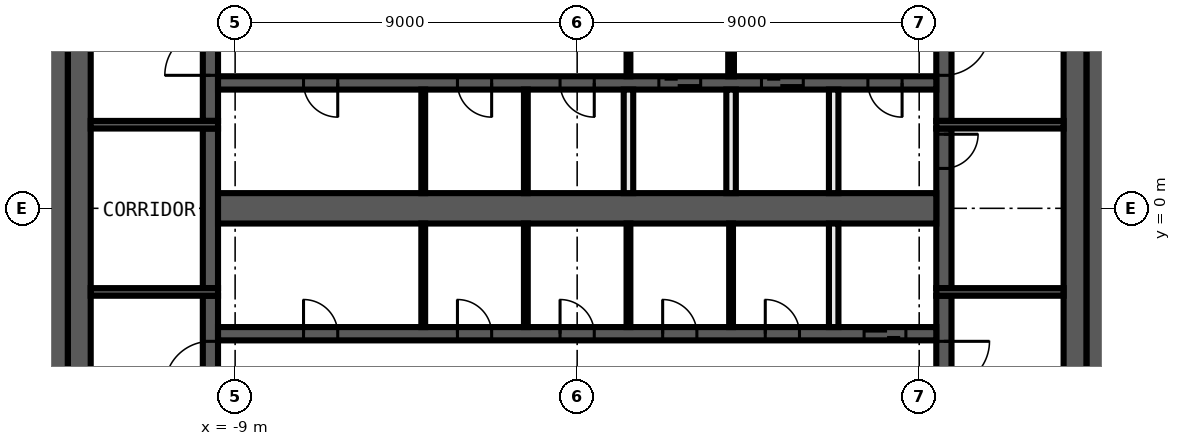
"""IFC4 building model, lengths in metres.
Left out: names, types, materials, properties, quantities, classifications, styles, units other than length and angle.
Written with IfcOpenShell. Run it as: python <this file> out.ifc"""

import sys

from ifc_helpers import new_model, si_unit, direction, frame, frame_2d, origin, place, context, subcontext, project, spatial, rectangle, extrude, element, fill, save


model = new_model("IFC4")
c1 = context("Model", 3, precision=1e-05, world=origin(), true_north=direction((0.0, 1.0)))
c2 = subcontext(c1, "Body", "Model", "MODEL_VIEW")
j1 = project(units=[si_unit("LENGTHUNIT", "METRE"), si_unit("PLANEANGLEUNIT", "RADIAN")], contexts=[c1])
p1 = place(None, origin())
s1 = spatial("IfcSite", under=j1, at=p1, CompositionType="ELEMENT")
p2 = place(p1, origin())
s2 = spatial("IfcBuilding", under=s1, at=p2, CompositionType="ELEMENT")
p3 = place(p2, frame((0.0, 0.0, 371.6)))
s3 = spatial("IfcBuildingStorey", under=s2, at=p3, CompositionType="ELEMENT", Elevation=371.6)
p4 = place(p3, frame((11.367, -20.469, 0.0), z_axis=(0.0, 0.0, 1.0), x_axis=(0.424125024155, 0.905603646131, 0.0)))
e1 = element("IfcWall", 1, at=p4, inside=s3, PredefinedType="SOLIDWALL", context=c2, shape_type="SweptSolid", body=[
    extrude(rectangle(XDim=28.801, YDim=0.25, at=frame_2d((14.401, 0.0))), origin(), (0.0, 0.0, 1.0), 3.8),
])
p5 = place(p3, frame((-11.138, 20.28, 0.0), z_axis=(0.0, 0.0, 1.0), x_axis=(-0.441342255748, -0.897338850876, 0.0)))
e2 = element("IfcWall", 2, at=p5, inside=s3, PredefinedType="SOLIDWALL", context=c2, shape_type="SweptSolid", body=[
    extrude(rectangle(XDim=28.805, YDim=0.25, at=frame_2d((14.403, 0.0))), origin(), (0.0, 0.0, 1.0), 3.8),
])
for number, where, z_axis, x_axis in (
    (3, (13.7, 10.4, 0.0), (0.0, 0.0, 1.0), (0.0, -1.0, 0.0)),
    (4, (-13.7, -10.4, 0.0), (0.0, 0.0, 1.0), (0.0, 1.0, 0.0)),
):
    element("IfcWall", number, at=place(p3, frame(where, z_axis=z_axis, x_axis=x_axis)), inside=s3, PredefinedType="SHEAR", context=c2, shape_type="SweptSolid", body=[
        extrude(rectangle(XDim=20.8, YDim=0.6, at=frame_2d((10.4, 0.0))), origin(), (0.0, 0.0, 1.0), 3.9),
    ])
for number, where, z_axis, x_axis in (
    (5, (13.1, 9.8, 0.0), (0.0, 0.0, 1.0), (0.0, -1.0, 0.0)),
    (6, (-13.1, -9.8, 0.0), (0.0, 0.0, 1.0), (0.0, 1.0, 0.0)),
):
    element("IfcWall", number, at=place(p3, frame(where, z_axis=z_axis, x_axis=x_axis)), inside=s3, PredefinedType="SHEAR", context=c2, shape_type="SweptSolid", body=[
        extrude(rectangle(XDim=19.6, YDim=0.6, at=frame_2d((9.8, 0.0))), origin(), (0.0, 0.0, 1.0), 3.9),
    ])
p6 = place(p3, frame((9.65, -2.3, 0.0), z_axis=(0.0, 0.0, 1.0), x_axis=(0.0, -1.0, 0.0)))
e7 = element("IfcWall", 7, at=p6, inside=s3, PredefinedType="SHEAR", context=c2, shape_type="SweptSolid", body=[
    extrude(rectangle(XDim=7.5, YDim=0.4, at=frame_2d((3.75, 0.0))), origin(), (0.0, 0.0, 1.0), 3.9),
])
p7 = place(p6, frame((1.2, 0.0, 0.0)))
e8 = element("IfcOpeningElement", 8, at=p7, cuts=e7, PredefinedType="OPENING", context=c2, shape_type="SweptSolid", body=[
    extrude(rectangle(XDim=1.2, YDim=2.1, at=frame_2d((0.6, 1.05))), frame((0.0, 0.21, 0.0), z_axis=(0.0, -1.0, 0.0), x_axis=(1.0, 0.0, 0.0)), (0.0, 0.0, 1.0), 0.42),
])
p8 = place(p3, frame((9.65, 2.1, 0.0), z_axis=(0.0, 0.0, 1.0), x_axis=(0.0, -1.0, 0.0)))
e9 = element("IfcWall", 9, at=p8, inside=s3, PredefinedType="SHEAR", context=c2, shape_type="SweptSolid", body=[
    extrude(rectangle(XDim=4.2, YDim=0.4, at=frame_2d((2.1, 0.0))), origin(), (0.0, 0.0, 1.0), 3.9),
])
p9 = place(p8, frame((0.15, 0.0, 0.0)))
e10 = element("IfcOpeningElement", 10, at=p9, cuts=e9, PredefinedType="OPENING", context=c2, shape_type="SweptSolid", body=[
    extrude(rectangle(XDim=0.9, YDim=2.1, at=frame_2d((0.45, 1.05))), frame((0.0, 0.21, 0.0), z_axis=(0.0, -1.0, 0.0), x_axis=(1.0, 0.0, 0.0)), (0.0, 0.0, 1.0), 0.42),
])
p10 = place(p3, frame((9.65, 9.8, 0.0), z_axis=(0.0, 0.0, 1.0), x_axis=(0.0, -1.0, 0.0)))
e11 = element("IfcWall", 11, at=p10, inside=s3, PredefinedType="SHEAR", context=c2, shape_type="SweptSolid", body=[
    extrude(rectangle(XDim=7.5, YDim=0.4, at=frame_2d((3.75, 0.0))), origin(), (0.0, 0.0, 1.0), 3.9),
])
p11 = place(p10, frame((5.1, 0.0, 0.0)))
e12 = element("IfcOpeningElement", 12, at=p11, cuts=e11, PredefinedType="OPENING", context=c2, shape_type="SweptSolid", body=[
    extrude(rectangle(XDim=1.2, YDim=2.1, at=frame_2d((0.6, 1.05))), frame((0.0, 0.21, 0.0), z_axis=(0.0, -1.0, 0.0), x_axis=(1.0, 0.0, 0.0)), (0.0, 0.0, 1.0), 0.42),
])
p12 = place(p3, frame((-9.65, -9.8, 0.0), z_axis=(0.0, 0.0, 1.0), x_axis=(0.0, 1.0, 0.0)))
e13 = element("IfcWall", 13, at=p12, inside=s3, PredefinedType="SHEAR", context=c2, shape_type="SweptSolid", body=[
    extrude(rectangle(XDim=7.5, YDim=0.4, at=frame_2d((3.75, 0.0))), origin(), (0.0, 0.0, 1.0), 3.9),
])
p13 = place(p12, frame((5.1, 0.0, 0.0)))
e14 = element("IfcOpeningElement", 14, at=p13, cuts=e13, PredefinedType="OPENING", context=c2, shape_type="SweptSolid", body=[
    extrude(rectangle(XDim=1.2, YDim=2.1, at=frame_2d((0.6, 1.05))), frame((0.0, 0.21, 0.0), z_axis=(0.0, -1.0, 0.0), x_axis=(1.0, 0.0, 0.0)), (0.0, 0.0, 1.0), 0.42),
])
p14 = place(p3, frame((-9.65, -2.1, 0.0), z_axis=(0.0, 0.0, 1.0), x_axis=(0.0, 1.0, 0.0)))
e15 = element("IfcWall", 15, at=p14, inside=s3, PredefinedType="SHEAR", context=c2, shape_type="SweptSolid", body=[
    extrude(rectangle(XDim=4.2, YDim=0.4, at=frame_2d((2.1, 0.0))), origin(), (0.0, 0.0, 1.0), 3.9),
])
p15 = place(p3, frame((-9.65, 2.3, 0.0), z_axis=(0.0, 0.0, 1.0), x_axis=(0.0, 1.0, 0.0)))
e16 = element("IfcWall", 16, at=p15, inside=s3, PredefinedType="SHEAR", context=c2, shape_type="SweptSolid", body=[
    extrude(rectangle(XDim=7.5, YDim=0.4, at=frame_2d((3.75, 0.0))), origin(), (0.0, 0.0, 1.0), 3.9),
])
p16 = place(p15, frame((1.2, 0.0, 0.0)))
e17 = element("IfcOpeningElement", 17, at=p16, cuts=e16, PredefinedType="OPENING", context=c2, shape_type="SweptSolid", body=[
    extrude(rectangle(XDim=1.2, YDim=2.1, at=frame_2d((0.6, 1.05))), frame((0.0, 0.21, 0.0), z_axis=(0.0, -1.0, 0.0), x_axis=(1.0, 0.0, 0.0)), (0.0, 0.0, 1.0), 0.42),
])
for number, where, z_axis, x_axis in (
    (18, (9.45, 2.2, 0.0), (0.0, 0.0, 1.0), (1.0, 0.0, 0.0)),
    (19, (-9.45, 2.2, 0.0), (0.0, 0.0, 1.0), (-1.0, 0.0, 0.0)),
    (20, (9.45, -2.2, 0.0), (0.0, 0.0, 1.0), (1.0, 0.0, 0.0)),
    (21, (-9.45, -2.2, 0.0), (0.0, 0.0, 1.0), (-1.0, 0.0, 0.0)),
):
    element("IfcWall", number, at=place(p3, frame(where, z_axis=z_axis, x_axis=x_axis)), inside=s3, PredefinedType="SHEAR", context=c2, shape_type="SweptSolid", body=[
        extrude(rectangle(XDim=3.35, YDim=0.2, at=frame_2d((1.675, 0.0))), origin(), (0.0, 0.0, 1.0), 3.9),
    ])
p17 = place(p3, frame((9.45, 3.3, 0.0), z_axis=(0.0, 0.0, 1.0), x_axis=(-1.0, 0.0, 0.0)))
e22 = element("IfcWall", 22, at=p17, inside=s3, PredefinedType="SHEAR", context=c2, shape_type="SweptSolid", body=[
    extrude(rectangle(XDim=18.9, YDim=0.35, at=frame_2d((9.45, 0.0))), origin(), (0.0, 0.0, 1.0), 3.9),
])
p18 = place(p17, frame((6.2, 0.0, 0.0)))
e23 = element("IfcOpeningElement", 23, at=p18, cuts=e22, PredefinedType="OPENING", context=c2, shape_type="SweptSolid", body=[
    extrude(rectangle(XDim=1.1, YDim=2.1, at=frame_2d((0.55, 1.05))), frame((0.0, 0.185, 0.0), z_axis=(0.0, -1.0, 0.0), x_axis=(1.0, 0.0, 0.0)), (0.0, 0.0, 1.0), 0.37),
])
p19 = place(p17, frame((3.5, 0.0, 0.0)))
e24 = element("IfcOpeningElement", 24, at=p19, cuts=e22, PredefinedType="OPENING", context=c2, shape_type="SweptSolid", body=[
    extrude(rectangle(XDim=1.1, YDim=2.1, at=frame_2d((0.55, 1.05))), frame((0.0, 0.185, 0.0), z_axis=(0.0, -1.0, 0.0), x_axis=(1.0, 0.0, 0.0)), (0.0, 0.0, 1.0), 0.37),
])
p20 = place(p17, frame((0.9, 0.0, 0.0)))
e25 = element("IfcOpeningElement", 25, at=p20, cuts=e22, PredefinedType="OPENING", context=c2, shape_type="SweptSolid", body=[
    extrude(rectangle(XDim=0.9, YDim=2.1, at=frame_2d((0.45, 1.05))), frame((0.0, 0.185, 0.0), z_axis=(0.0, -1.0, 0.0), x_axis=(1.0, 0.0, 0.0)), (0.0, 0.0, 1.0), 0.37),
])
p21 = place(p17, frame((15.75, 0.0, 0.0)))
e26 = element("IfcOpeningElement", 26, at=p21, cuts=e22, PredefinedType="OPENING", context=c2, shape_type="SweptSolid", body=[
    extrude(rectangle(XDim=0.9, YDim=2.1, at=frame_2d((0.45, 1.05))), frame((0.0, 0.185, 0.0), z_axis=(0.0, -1.0, 0.0), x_axis=(1.0, 0.0, 0.0)), (0.0, 0.0, 1.0), 0.37),
])
p22 = place(p17, frame((11.7, 0.0, 0.0)))
e27 = element("IfcOpeningElement", 27, at=p22, cuts=e22, PredefinedType="OPENING", context=c2, shape_type="SweptSolid", body=[
    extrude(rectangle(XDim=0.9, YDim=2.1, at=frame_2d((0.45, 1.05))), frame((0.0, 0.185, 0.0), z_axis=(0.0, -1.0, 0.0), x_axis=(1.0, 0.0, 0.0)), (0.0, 0.0, 1.0), 0.37),
])
p23 = place(p17, frame((9.0, 0.0, 0.0)))
e28 = element("IfcOpeningElement", 28, at=p23, cuts=e22, PredefinedType="OPENING", context=c2, shape_type="SweptSolid", body=[
    extrude(rectangle(XDim=0.9, YDim=2.1, at=frame_2d((0.45, 1.05))), frame((0.0, 0.185, 0.0), z_axis=(0.0, -1.0, 0.0), x_axis=(1.0, 0.0, 0.0)), (0.0, 0.0, 1.0), 0.37),
])
p24 = place(p3, frame((-9.45, -3.3, 0.0), z_axis=(0.0, 0.0, 1.0), x_axis=(1.0, 0.0, 0.0)))
e29 = element("IfcWall", 29, at=p24, inside=s3, PredefinedType="SHEAR", context=c2, shape_type="SweptSolid", body=[
    extrude(rectangle(XDim=18.9, YDim=0.35, at=frame_2d((9.45, 0.0))), origin(), (0.0, 0.0, 1.0), 3.9),
])
p25 = place(p24, frame((17.0, 0.0, 0.0)))
e30 = element("IfcOpeningElement", 30, at=p25, cuts=e29, PredefinedType="OPENING", context=c2, shape_type="SweptSolid", body=[
    extrude(rectangle(XDim=1.1, YDim=2.1, at=frame_2d((0.55, 1.05))), frame((0.0, 0.185, 0.0), z_axis=(0.0, -1.0, 0.0), x_axis=(1.0, 0.0, 0.0)), (0.0, 0.0, 1.0), 0.37),
])
p26 = place(p24, frame((2.25, 0.0, 0.0)))
e31 = element("IfcOpeningElement", 31, at=p26, cuts=e29, PredefinedType="OPENING", context=c2, shape_type="SweptSolid", body=[
    extrude(rectangle(XDim=0.9, YDim=2.1, at=frame_2d((0.45, 1.05))), frame((0.0, 0.185, 0.0), z_axis=(0.0, -1.0, 0.0), x_axis=(1.0, 0.0, 0.0)), (0.0, 0.0, 1.0), 0.37),
])
p27 = place(p24, frame((6.3, 0.0, 0.0)))
e32 = element("IfcOpeningElement", 32, at=p27, cuts=e29, PredefinedType="OPENING", context=c2, shape_type="SweptSolid", body=[
    extrude(rectangle(XDim=0.9, YDim=2.1, at=frame_2d((0.45, 1.05))), frame((0.0, 0.185, 0.0), z_axis=(0.0, -1.0, 0.0), x_axis=(1.0, 0.0, 0.0)), (0.0, 0.0, 1.0), 0.37),
])
p28 = place(p24, frame((9.0, 0.0, 0.0)))
e33 = element("IfcOpeningElement", 33, at=p28, cuts=e29, PredefinedType="OPENING", context=c2, shape_type="SweptSolid", body=[
    extrude(rectangle(XDim=0.9, YDim=2.1, at=frame_2d((0.45, 1.05))), frame((0.0, 0.185, 0.0), z_axis=(0.0, -1.0, 0.0), x_axis=(1.0, 0.0, 0.0)), (0.0, 0.0, 1.0), 0.37),
])
p29 = place(p24, frame((11.7, 0.0, 0.0)))
e34 = element("IfcOpeningElement", 34, at=p29, cuts=e29, PredefinedType="OPENING", context=c2, shape_type="SweptSolid", body=[
    extrude(rectangle(XDim=0.9, YDim=2.1, at=frame_2d((0.45, 1.05))), frame((0.0, 0.185, 0.0), z_axis=(0.0, -1.0, 0.0), x_axis=(1.0, 0.0, 0.0)), (0.0, 0.0, 1.0), 0.37),
])
p30 = place(p24, frame((14.4, 0.0, 0.0)))
e35 = element("IfcOpeningElement", 35, at=p30, cuts=e29, PredefinedType="OPENING", context=c2, shape_type="SweptSolid", body=[
    extrude(rectangle(XDim=0.9, YDim=2.1, at=frame_2d((0.45, 1.05))), frame((0.0, 0.185, 0.0), z_axis=(0.0, -1.0, 0.0), x_axis=(1.0, 0.0, 0.0)), (0.0, 0.0, 1.0), 0.37),
])
p31 = place(p3, frame((-9.45, 0.0, 0.0), z_axis=(0.0, 0.0, 1.0), x_axis=(1.0, 0.0, 0.0)))
e36 = element("IfcWall", 36, at=p31, inside=s3, PredefinedType="SHEAR", context=c2, shape_type="SweptSolid", body=[
    extrude(rectangle(XDim=18.9, YDim=0.8, at=frame_2d((9.45, 0.0))), origin(), (0.0, 0.0, 1.0), 3.9),
])
for number, where, z_axis, x_axis in (
    (37, (6.75, -3.125, 0.0), (0.0, 0.0, 1.0), (0.0, 1.0, 0.0)),
    (38, (6.75, 0.4, 0.0), (0.0, 0.0, 1.0), (0.0, 1.0, 0.0)),
):
    element("IfcWall", number, at=place(p3, frame(where, z_axis=z_axis, x_axis=x_axis)), inside=s3, PredefinedType="SOLIDWALL", context=c2, shape_type="SweptSolid", body=[
        extrude(rectangle(XDim=2.725, YDim=0.25, at=frame_2d((1.363, 0.0))), origin(), (0.0, 0.0, 1.0), 3.9),
    ])
p32 = place(p3, frame((4.05, 6.725, 0.0), z_axis=(0.0, 0.0, 1.0), x_axis=(0.0, -1.0, 0.0)))
e39 = element("IfcWall", 39, at=p32, inside=s3, PredefinedType="PARTITIONING", context=c2, shape_type="SweptSolid", body=[
    extrude(rectangle(XDim=3.25, YDim=0.15, at=frame_2d((1.625, 0.0))), origin(), (0.0, 0.0, 1.0), 3.9),
])
p33 = place(p32, frame((1.025, 0.0, 0.0)))
e40 = element("IfcOpeningElement", 40, at=p33, cuts=e39, PredefinedType="OPENING", context=c2, shape_type="SweptSolid", body=[
    extrude(rectangle(XDim=1.2, YDim=2.1, at=frame_2d((0.6, 1.05))), frame((0.0, 0.085, 0.0), z_axis=(0.0, -1.0, 0.0), x_axis=(1.0, 0.0, 0.0)), (0.0, 0.0, 1.0), 0.17),
])
p34 = place(p3, frame((4.05, -3.125, 0.0), z_axis=(0.0, 0.0, 1.0), x_axis=(0.0, 1.0, 0.0)))
e41 = element("IfcWall", 41, at=p34, inside=s3, PredefinedType="PARTITIONING", context=c2, shape_type="SweptSolid", body=[
    extrude(rectangle(XDim=2.725, YDim=0.1, at=frame_2d((1.363, 0.0))), origin(), (0.0, 0.0, 1.0), 3.9),
])
p35 = place(p3, frame((4.05, 0.4, 0.0), z_axis=(0.0, 0.0, 1.0), x_axis=(0.0, 1.0, 0.0)))
e42 = element("IfcWall", 42, at=p35, inside=s3, PredefinedType="SOLIDWALL", context=c2, shape_type="SweptSolid", body=[
    extrude(rectangle(XDim=2.725, YDim=0.25, at=frame_2d((1.363, 0.0))), origin(), (0.0, 0.0, 1.0), 3.9),
])
p36 = place(p3, frame((1.35, -3.125, 0.0), z_axis=(0.0, 0.0, 1.0), x_axis=(0.0, 1.0, 0.0)))
e43 = element("IfcWall", 43, at=p36, inside=s3, PredefinedType="PARTITIONING", context=c2, shape_type="SweptSolid", body=[
    extrude(rectangle(XDim=2.725, YDim=0.1, at=frame_2d((1.363, 0.0))), origin(), (0.0, 0.0, 1.0), 3.9),
])
p37 = place(p3, frame((1.35, 6.725, 0.0), z_axis=(0.0, 0.0, 1.0), x_axis=(0.0, -1.0, 0.0)))
e44 = element("IfcWall", 44, at=p37, inside=s3, PredefinedType="PARTITIONING", context=c2, shape_type="SweptSolid", body=[
    extrude(rectangle(XDim=3.25, YDim=0.1, at=frame_2d((1.625, 0.0))), origin(), (0.0, 0.0, 1.0), 3.9),
])
p38 = place(p37, frame((1.025, 0.0, 0.0)))
e45 = element("IfcOpeningElement", 45, at=p38, cuts=e44, PredefinedType="OPENING", context=c2, shape_type="SweptSolid", body=[
    extrude(rectangle(XDim=1.2, YDim=2.1, at=frame_2d((0.6, 1.05))), frame((0.0, 0.06, 0.0), z_axis=(0.0, -1.0, 0.0), x_axis=(1.0, 0.0, 0.0)), (0.0, 0.0, 1.0), 0.12),
])
p39 = place(p3, frame((1.35, 0.4, 0.0), z_axis=(0.0, 0.0, 1.0), x_axis=(0.0, 1.0, 0.0)))
e46 = element("IfcWall", 46, at=p39, inside=s3, PredefinedType="SOLIDWALL", context=c2, shape_type="SweptSolid", body=[
    extrude(rectangle(XDim=2.725, YDim=0.25, at=frame_2d((1.363, 0.0))), origin(), (0.0, 0.0, 1.0), 3.9),
])
for number, where, z_axis, x_axis in (
    (47, (-1.35, -3.125, 0.0), (0.0, 0.0, 1.0), (0.0, 1.0, 0.0)),
    (48, (-1.35, 0.4, 0.0), (0.0, 0.0, 1.0), (0.0, 1.0, 0.0)),
    (49, (-4.05, -3.125, 0.0), (0.0, 0.0, 1.0), (0.0, 1.0, 0.0)),
    (50, (-4.05, 0.4, 0.0), (0.0, 0.0, 1.0), (0.0, 1.0, 0.0)),
):
    element("IfcWall", number, at=place(p3, frame(where, z_axis=z_axis, x_axis=x_axis)), inside=s3, PredefinedType="PARTITIONING", context=c2, shape_type="SweptSolid", body=[
        extrude(rectangle(XDim=2.725, YDim=0.1, at=frame_2d((1.363, 0.0))), origin(), (0.0, 0.0, 1.0), 3.9),
    ])
p40 = place(p9, origin())
e51 = element("IfcDoor", 51, at=p40, inside=s3, OperationType="SINGLE_SWING_RIGHT", PredefinedType="DOOR", context=c2, shape_type="SweptSolid", body=[
    extrude(rectangle(XDim=0.9, YDim=2.1, at=frame_2d((0.45, 1.05))), frame((0.0, 0.025, 0.0), z_axis=(0.0, -1.0, 0.0), x_axis=(1.0, 0.0, 0.0)), (0.0, 0.0, 1.0), 0.05),
])
fill(e10, e51)
p41 = place(p18, origin())
e52 = element("IfcDoor", 52, at=p41, inside=s3, OperationType="DOUBLE_DOOR_SLIDING", PredefinedType="DOOR", context=c2, shape_type="SweptSolid", body=[
    extrude(rectangle(XDim=1.1, YDim=2.1, at=frame_2d((0.55, 1.05))), frame((0.0, 0.025, 0.0), z_axis=(0.0, -1.0, 0.0), x_axis=(1.0, 0.0, 0.0)), (0.0, 0.0, 1.0), 0.05),
])
fill(e23, e52)
p42 = place(p19, origin())
e53 = element("IfcDoor", 53, at=p42, inside=s3, OperationType="DOUBLE_DOOR_SLIDING", PredefinedType="DOOR", context=c2, shape_type="SweptSolid", body=[
    extrude(rectangle(XDim=1.1, YDim=2.1, at=frame_2d((0.55, 1.05))), frame((0.0, 0.025, 0.0), z_axis=(0.0, -1.0, 0.0), x_axis=(1.0, 0.0, 0.0)), (0.0, 0.0, 1.0), 0.05),
])
fill(e24, e53)
p43 = place(p20, origin())
e54 = element("IfcDoor", 54, at=p43, inside=s3, OperationType="SINGLE_SWING_LEFT", PredefinedType="DOOR", context=c2, shape_type="SweptSolid", body=[
    extrude(rectangle(XDim=0.9, YDim=2.1, at=frame_2d((0.45, 1.05))), frame((0.0, 0.025, 0.0), z_axis=(0.0, -1.0, 0.0), x_axis=(1.0, 0.0, 0.0)), (0.0, 0.0, 1.0), 0.05),
])
fill(e25, e54)
p44 = place(p25, origin())
e55 = element("IfcDoor", 55, at=p44, inside=s3, OperationType="DOUBLE_DOOR_SLIDING", PredefinedType="DOOR", context=c2, shape_type="SweptSolid", body=[
    extrude(rectangle(XDim=1.1, YDim=2.1, at=frame_2d((0.55, 1.05))), frame((0.0, 0.025, 0.0), z_axis=(0.0, -1.0, 0.0), x_axis=(1.0, 0.0, 0.0)), (0.0, 0.0, 1.0), 0.05),
])
fill(e30, e55)
p45 = place(p21, origin())
e56 = element("IfcDoor", 56, at=p45, inside=s3, OperationType="SINGLE_SWING_RIGHT", PredefinedType="DOOR", context=c2, shape_type="SweptSolid", body=[
    extrude(rectangle(XDim=0.9, YDim=2.1, at=frame_2d((0.45, 1.05))), frame((0.0, 0.025, 0.0), z_axis=(0.0, -1.0, 0.0), x_axis=(1.0, 0.0, 0.0)), (0.0, 0.0, 1.0), 0.05),
])
fill(e26, e56)
p46 = place(p22, origin())
e57 = element("IfcDoor", 57, at=p46, inside=s3, OperationType="SINGLE_SWING_LEFT", PredefinedType="DOOR", context=c2, shape_type="SweptSolid", body=[
    extrude(rectangle(XDim=0.9, YDim=2.1, at=frame_2d((0.45, 1.05))), frame((0.0, 0.025, 0.0), z_axis=(0.0, -1.0, 0.0), x_axis=(1.0, 0.0, 0.0)), (0.0, 0.0, 1.0), 0.05),
])
fill(e27, e57)
p47 = place(p23, origin())
e58 = element("IfcDoor", 58, at=p47, inside=s3, OperationType="SINGLE_SWING_RIGHT", PredefinedType="DOOR", context=c2, shape_type="SweptSolid", body=[
    extrude(rectangle(XDim=0.9, YDim=2.1, at=frame_2d((0.45, 1.05))), frame((0.0, 0.025, 0.0), z_axis=(0.0, -1.0, 0.0), x_axis=(1.0, 0.0, 0.0)), (0.0, 0.0, 1.0), 0.05),
])
fill(e28, e58)
p48 = place(p26, origin())
e59 = element("IfcDoor", 59, at=p48, inside=s3, OperationType="SINGLE_SWING_LEFT", PredefinedType="DOOR", context=c2, shape_type="SweptSolid", body=[
    extrude(rectangle(XDim=0.9, YDim=2.1, at=frame_2d((0.45, 1.05))), frame((0.0, 0.025, 0.0), z_axis=(0.0, -1.0, 0.0), x_axis=(1.0, 0.0, 0.0)), (0.0, 0.0, 1.0), 0.05),
])
fill(e31, e59)
p49 = place(p27, origin())
e60 = element("IfcDoor", 60, at=p49, inside=s3, OperationType="SINGLE_SWING_RIGHT", PredefinedType="DOOR", context=c2, shape_type="SweptSolid", body=[
    extrude(rectangle(XDim=0.9, YDim=2.1, at=frame_2d((0.45, 1.05))), frame((0.0, 0.025, 0.0), z_axis=(0.0, -1.0, 0.0), x_axis=(1.0, 0.0, 0.0)), (0.0, 0.0, 1.0), 0.05),
])
fill(e32, e60)
p50 = place(p28, origin())
e61 = element("IfcDoor", 61, at=p50, inside=s3, OperationType="SINGLE_SWING_LEFT", PredefinedType="DOOR", context=c2, shape_type="SweptSolid", body=[
    extrude(rectangle(XDim=0.9, YDim=2.1, at=frame_2d((0.45, 1.05))), frame((0.0, 0.025, 0.0), z_axis=(0.0, -1.0, 0.0), x_axis=(1.0, 0.0, 0.0)), (0.0, 0.0, 1.0), 0.05),
])
fill(e33, e61)
p51 = place(p29, origin())
e62 = element("IfcDoor", 62, at=p51, inside=s3, OperationType="SINGLE_SWING_RIGHT", PredefinedType="DOOR", context=c2, shape_type="SweptSolid", body=[
    extrude(rectangle(XDim=0.9, YDim=2.1, at=frame_2d((0.45, 1.05))), frame((0.0, 0.025, 0.0), z_axis=(0.0, -1.0, 0.0), x_axis=(1.0, 0.0, 0.0)), (0.0, 0.0, 1.0), 0.05),
])
fill(e34, e62)
p52 = place(p30, origin())
e63 = element("IfcDoor", 63, at=p52, inside=s3, OperationType="SINGLE_SWING_LEFT", PredefinedType="DOOR", context=c2, shape_type="SweptSolid", body=[
    extrude(rectangle(XDim=0.9, YDim=2.1, at=frame_2d((0.45, 1.05))), frame((0.0, 0.025, 0.0), z_axis=(0.0, -1.0, 0.0), x_axis=(1.0, 0.0, 0.0)), (0.0, 0.0, 1.0), 0.05),
])
fill(e35, e63)
p53 = place(p11, origin())
e64 = element("IfcDoor", 64, at=p53, inside=s3, OperationType="SINGLE_SWING_LEFT", PredefinedType="DOOR", context=c2, shape_type="SweptSolid", body=[
    extrude(rectangle(XDim=1.2, YDim=2.1, at=frame_2d((0.6, 1.05))), frame((0.0, 0.025, 0.0), z_axis=(0.0, -1.0, 0.0), x_axis=(1.0, 0.0, 0.0)), (0.0, 0.0, 1.0), 0.05),
])
fill(e12, e64)
p54 = place(p16, origin())
e65 = element("IfcDoor", 65, at=p54, inside=s3, OperationType="SINGLE_SWING_RIGHT", PredefinedType="DOOR", context=c2, shape_type="SweptSolid", body=[
    extrude(rectangle(XDim=1.2, YDim=2.1, at=frame_2d((0.6, 1.05))), frame((0.0, 0.025, 0.0), z_axis=(0.0, -1.0, 0.0), x_axis=(1.0, 0.0, 0.0)), (0.0, 0.0, 1.0), 0.05),
])
fill(e17, e65)
p55 = place(p7, origin())
e66 = element("IfcDoor", 66, at=p55, inside=s3, OperationType="SINGLE_SWING_RIGHT", PredefinedType="DOOR", context=c2, shape_type="SweptSolid", body=[
    extrude(rectangle(XDim=1.2, YDim=2.1, at=frame_2d((0.6, 1.05))), frame((0.0, 0.025, 0.0), z_axis=(0.0, -1.0, 0.0), x_axis=(1.0, 0.0, 0.0)), (0.0, 0.0, 1.0), 0.05),
])
fill(e8, e66)
p56 = place(p13, origin())
e67 = element("IfcDoor", 67, at=p56, inside=s3, OperationType="SINGLE_SWING_LEFT", PredefinedType="DOOR", context=c2, shape_type="SweptSolid", body=[
    extrude(rectangle(XDim=1.2, YDim=2.1, at=frame_2d((0.6, 1.05))), frame((0.0, 0.025, 0.0), z_axis=(0.0, -1.0, 0.0), x_axis=(1.0, 0.0, 0.0)), (0.0, 0.0, 1.0), 0.05),
])
fill(e14, e67)
save(model, sys.argv[1])
